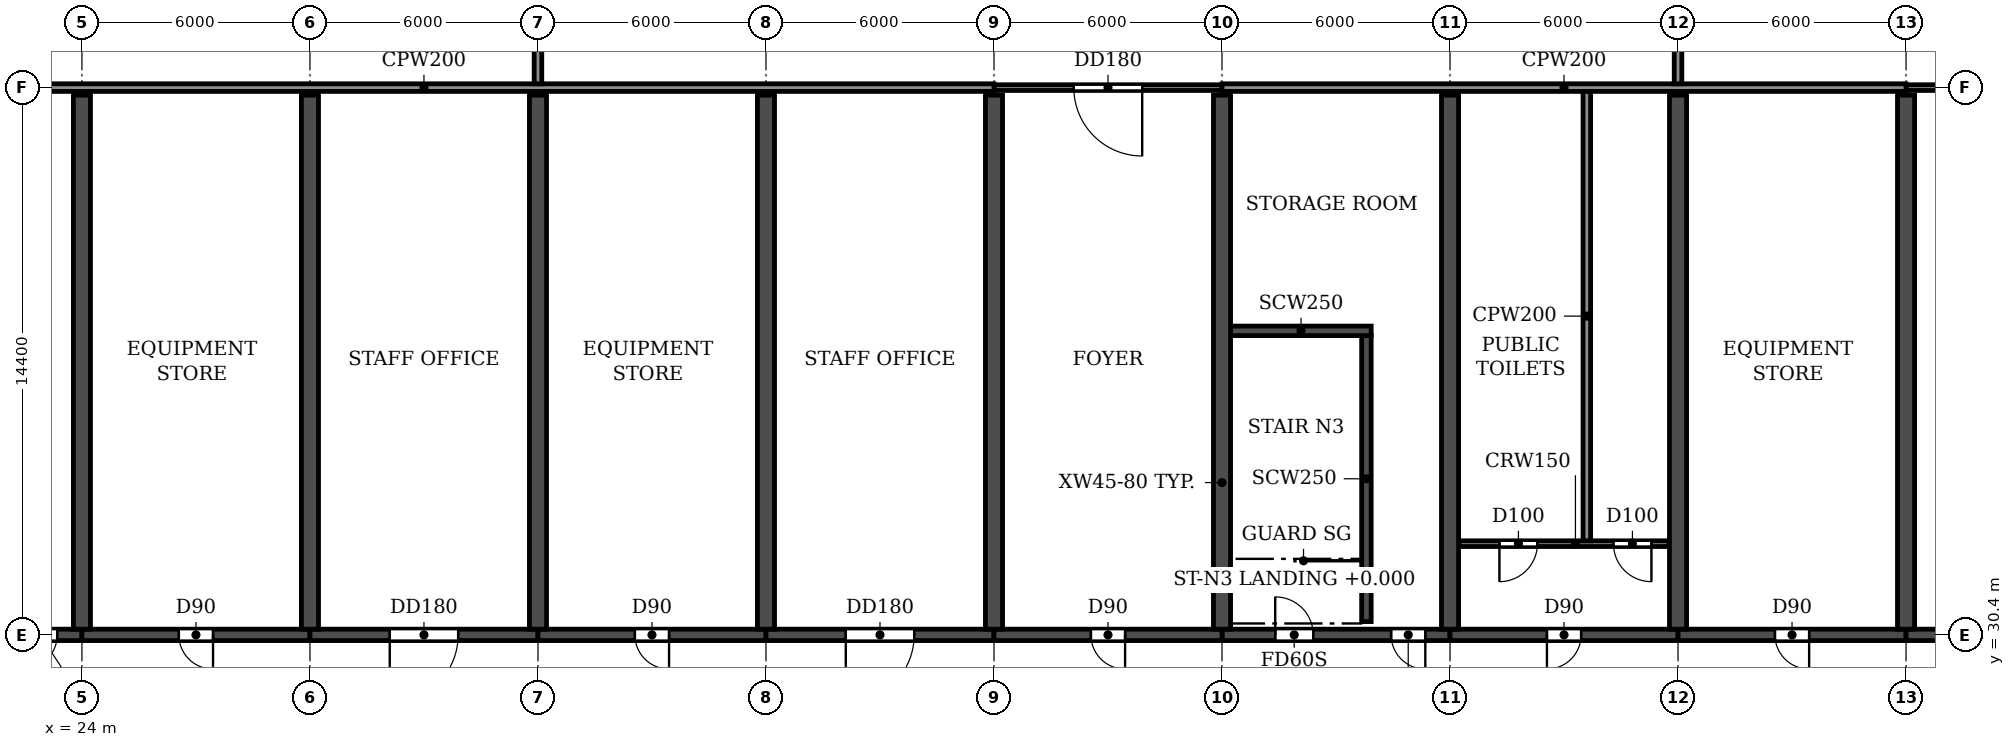
"""IFC4 building model, lengths in metres.
Left out: names, types, materials, properties, quantities, classifications, styles, units other than length and angle.
Written with IfcOpenShell. Run it as: python <this file> out.ifc"""

import sys

from ifc_helpers import new_model, si_unit, direction, frame, frame_2d, origin, place, context, subcontext, project, spatial, rectangle, extrude, element, fill, save


model = new_model("IFC4")
c1 = context("Model", 3, precision=1e-05, world=origin(), true_north=direction((0.0, 1.0)))
c2 = subcontext(c1, "Body", "Model", "MODEL_VIEW")
j1 = project(units=[si_unit("LENGTHUNIT", "METRE"), si_unit("PLANEANGLEUNIT", "RADIAN")], contexts=[c1])
p1 = place(None, origin())
s1 = spatial("IfcSite", under=j1, at=p1, CompositionType="ELEMENT")
p2 = place(p1, origin())
s2 = spatial("IfcBuilding", under=s1, at=p2, CompositionType="ELEMENT")
p3 = place(p2, frame((0.0, 0.0, 19.2)))
s3 = spatial("IfcBuildingStorey", under=s2, at=p3, CompositionType="ELEMENT", Elevation=19.2)
for number, where, z_axis, x_axis in (
    (1, (24.0, 30.55, 0.0), (0.0, 0.0, 1.0), (0.0, 1.0, 0.0)),
    (2, (30.0, 30.55, 0.0), (0.0, 0.0, 1.0), (0.0, 1.0, 0.0)),
    (3, (36.0, 30.55, 0.0), (0.0, 0.0, 1.0), (0.0, 1.0, 0.0)),
    (4, (42.0, 30.55, 0.0), (0.0, 0.0, 1.0), (0.0, 1.0, 0.0)),
    (5, (48.0, 30.55, 0.0), (0.0, 0.0, 1.0), (0.0, 1.0, 0.0)),
    (6, (54.0, 30.55, 0.0), (0.0, 0.0, 1.0), (0.0, 1.0, 0.0)),
    (7, (60.0, 30.55, 0.0), (0.0, 0.0, 1.0), (0.0, 1.0, 0.0)),
    (8, (66.0, 30.55, 0.0), (0.0, 0.0, 1.0), (0.0, 1.0, 0.0)),
    (9, (72.0, 30.55, 0.0), (0.0, 0.0, 1.0), (0.0, 1.0, 0.0)),
):
    element("IfcWall", number, at=place(p3, frame(where, z_axis=z_axis, x_axis=x_axis)), inside=s3, PredefinedType="SHEAR", context=c2, shape_type="SweptSolid", body=[
        extrude(rectangle(XDim=14.05, YDim=0.45, at=frame_2d((7.025, 0.0))), origin(), (0.0, 0.0, 1.0), 3.95),
    ])
p4 = place(p3, frame((18.0, 30.4, 0.0), z_axis=(0.0, 0.0, 1.0), x_axis=(1.0, 0.0, 0.0)))
e10 = element("IfcWall", 10, at=p4, inside=s3, PredefinedType="SHEAR", context=c2, shape_type="SweptSolid", body=[
    extrude(rectangle(XDim=6.0, YDim=0.3, at=frame_2d((3.0, 0.0))), origin(), (0.0, 0.0, 1.0), 3.35),
])
p5 = place(p4, frame((1.4, 0.0, 0.0)))
e11 = element("IfcOpeningElement", 11, at=p5, cuts=e10, PredefinedType="OPENING", context=c2, shape_type="SweptSolid", body=[
    extrude(rectangle(XDim=1.0, YDim=2.1, at=frame_2d((0.5, 1.05))), frame((0.0, 0.16, 0.0), z_axis=(0.0, -1.0, 0.0), x_axis=(1.0, 0.0, 0.0)), (0.0, 0.0, 1.0), 0.32),
])
p6 = place(p4, frame((4.45, 0.0, 0.0)))
e12 = element("IfcOpeningElement", 12, at=p6, cuts=e10, PredefinedType="OPENING", context=c2, shape_type="SweptSolid", body=[
    extrude(rectangle(XDim=0.9, YDim=2.1, at=frame_2d((0.45, 1.05))), frame((0.0, 0.16, 0.0), z_axis=(0.0, -1.0, 0.0), x_axis=(1.0, 0.0, 0.0)), (0.0, 0.0, 1.0), 0.32),
])
p7 = place(p3, frame((24.0, 30.4, 0.0), z_axis=(0.0, 0.0, 1.0), x_axis=(1.0, 0.0, 0.0)))
e13 = element("IfcWall", 13, at=p7, inside=s3, PredefinedType="SHEAR", context=c2, shape_type="SweptSolid", body=[
    extrude(rectangle(XDim=6.0, YDim=0.3, at=frame_2d((3.0, 0.0))), origin(), (0.0, 0.0, 1.0), 3.35),
])
p8 = place(p7, frame((2.55, 0.0, 0.0)))
e14 = element("IfcOpeningElement", 14, at=p8, cuts=e13, PredefinedType="OPENING", context=c2, shape_type="SweptSolid", body=[
    extrude(rectangle(XDim=0.9, YDim=2.1, at=frame_2d((0.45, 1.05))), frame((0.0, 0.16, 0.0), z_axis=(0.0, -1.0, 0.0), x_axis=(1.0, 0.0, 0.0)), (0.0, 0.0, 1.0), 0.32),
])
p9 = place(p3, frame((30.0, 30.4, 0.0), z_axis=(0.0, 0.0, 1.0), x_axis=(1.0, 0.0, 0.0)))
e15 = element("IfcWall", 15, at=p9, inside=s3, PredefinedType="SHEAR", context=c2, shape_type="SweptSolid", body=[
    extrude(rectangle(XDim=6.0, YDim=0.3, at=frame_2d((3.0, 0.0))), origin(), (0.0, 0.0, 1.0), 3.35),
])
p10 = place(p9, frame((2.1, 0.0, 0.0)))
e16 = element("IfcOpeningElement", 16, at=p10, cuts=e15, PredefinedType="OPENING", context=c2, shape_type="SweptSolid", body=[
    extrude(rectangle(XDim=1.8, YDim=2.1, at=frame_2d((0.9, 1.05))), frame((0.0, 0.16, 0.0), z_axis=(0.0, -1.0, 0.0), x_axis=(1.0, 0.0, 0.0)), (0.0, 0.0, 1.0), 0.32),
])
p11 = place(p3, frame((36.0, 30.4, 0.0), z_axis=(0.0, 0.0, 1.0), x_axis=(1.0, 0.0, 0.0)))
e17 = element("IfcWall", 17, at=p11, inside=s3, PredefinedType="SHEAR", context=c2, shape_type="SweptSolid", body=[
    extrude(rectangle(XDim=6.0, YDim=0.3, at=frame_2d((3.0, 0.0))), origin(), (0.0, 0.0, 1.0), 3.35),
])
p12 = place(p11, frame((2.55, 0.0, 0.0)))
e18 = element("IfcOpeningElement", 18, at=p12, cuts=e17, PredefinedType="OPENING", context=c2, shape_type="SweptSolid", body=[
    extrude(rectangle(XDim=0.9, YDim=2.1, at=frame_2d((0.45, 1.05))), frame((0.0, 0.16, 0.0), z_axis=(0.0, -1.0, 0.0), x_axis=(1.0, 0.0, 0.0)), (0.0, 0.0, 1.0), 0.32),
])
p13 = place(p3, frame((42.0, 30.4, 0.0), z_axis=(0.0, 0.0, 1.0), x_axis=(1.0, 0.0, 0.0)))
e19 = element("IfcWall", 19, at=p13, inside=s3, PredefinedType="SHEAR", context=c2, shape_type="SweptSolid", body=[
    extrude(rectangle(XDim=6.0, YDim=0.3, at=frame_2d((3.0, 0.0))), origin(), (0.0, 0.0, 1.0), 3.35),
])
p14 = place(p13, frame((2.1, 0.0, 0.0)))
e20 = element("IfcOpeningElement", 20, at=p14, cuts=e19, PredefinedType="OPENING", context=c2, shape_type="SweptSolid", body=[
    extrude(rectangle(XDim=1.8, YDim=2.1, at=frame_2d((0.9, 1.05))), frame((0.0, 0.16, 0.0), z_axis=(0.0, -1.0, 0.0), x_axis=(1.0, 0.0, 0.0)), (0.0, 0.0, 1.0), 0.32),
])
p15 = place(p3, frame((48.0, 30.4, 0.0), z_axis=(0.0, 0.0, 1.0), x_axis=(1.0, 0.0, 0.0)))
e21 = element("IfcWall", 21, at=p15, inside=s3, PredefinedType="SHEAR", context=c2, shape_type="SweptSolid", body=[
    extrude(rectangle(XDim=6.0, YDim=0.3, at=frame_2d((3.0, 0.0))), origin(), (0.0, 0.0, 1.0), 3.35),
])
p16 = place(p15, frame((2.55, 0.0, 0.0)))
e22 = element("IfcOpeningElement", 22, at=p16, cuts=e21, PredefinedType="OPENING", context=c2, shape_type="SweptSolid", body=[
    extrude(rectangle(XDim=0.9, YDim=2.1, at=frame_2d((0.45, 1.05))), frame((0.0, 0.16, 0.0), z_axis=(0.0, -1.0, 0.0), x_axis=(1.0, 0.0, 0.0)), (0.0, 0.0, 1.0), 0.32),
])
p17 = place(p3, frame((54.0, 30.4, 0.0), z_axis=(0.0, 0.0, 1.0), x_axis=(1.0, 0.0, 0.0)))
e23 = element("IfcWall", 23, at=p17, inside=s3, PredefinedType="SHEAR", context=c2, shape_type="SweptSolid", body=[
    extrude(rectangle(XDim=6.0, YDim=0.3, at=frame_2d((3.0, 0.0))), origin(), (0.0, 0.0, 1.0), 3.35),
])
p18 = place(p17, frame((1.4, 0.0, 0.0)))
e24 = element("IfcOpeningElement", 24, at=p18, cuts=e23, PredefinedType="OPENING", context=c2, shape_type="SweptSolid", body=[
    extrude(rectangle(XDim=1.0, YDim=2.1, at=frame_2d((0.5, 1.05))), frame((0.0, 0.16, 0.0), z_axis=(0.0, -1.0, 0.0), x_axis=(1.0, 0.0, 0.0)), (0.0, 0.0, 1.0), 0.32),
])
p19 = place(p17, frame((4.45, 0.0, 0.0)))
e25 = element("IfcOpeningElement", 25, at=p19, cuts=e23, PredefinedType="OPENING", context=c2, shape_type="SweptSolid", body=[
    extrude(rectangle(XDim=0.9, YDim=2.1, at=frame_2d((0.45, 1.05))), frame((0.0, 0.16, 0.0), z_axis=(0.0, -1.0, 0.0), x_axis=(1.0, 0.0, 0.0)), (0.0, 0.0, 1.0), 0.32),
])
p20 = place(p3, frame((60.0, 30.4, 0.0), z_axis=(0.0, 0.0, 1.0), x_axis=(1.0, 0.0, 0.0)))
e26 = element("IfcWall", 26, at=p20, inside=s3, PredefinedType="SHEAR", context=c2, shape_type="SweptSolid", body=[
    extrude(rectangle(XDim=6.0, YDim=0.3, at=frame_2d((3.0, 0.0))), origin(), (0.0, 0.0, 1.0), 3.35),
])
p21 = place(p20, frame((2.55, 0.0, 0.0)))
e27 = element("IfcOpeningElement", 27, at=p21, cuts=e26, PredefinedType="OPENING", context=c2, shape_type="SweptSolid", body=[
    extrude(rectangle(XDim=0.9, YDim=2.1, at=frame_2d((0.45, 1.05))), frame((0.0, 0.16, 0.0), z_axis=(0.0, -1.0, 0.0), x_axis=(1.0, 0.0, 0.0)), (0.0, 0.0, 1.0), 0.32),
])
p22 = place(p3, frame((66.0, 30.4, 0.0), z_axis=(0.0, 0.0, 1.0), x_axis=(1.0, 0.0, 0.0)))
e28 = element("IfcWall", 28, at=p22, inside=s3, PredefinedType="SHEAR", context=c2, shape_type="SweptSolid", body=[
    extrude(rectangle(XDim=6.0, YDim=0.3, at=frame_2d((3.0, 0.0))), origin(), (0.0, 0.0, 1.0), 3.35),
])
p23 = place(p22, frame((2.55, 0.0, 0.0)))
e29 = element("IfcOpeningElement", 29, at=p23, cuts=e28, PredefinedType="OPENING", context=c2, shape_type="SweptSolid", body=[
    extrude(rectangle(XDim=0.9, YDim=2.1, at=frame_2d((0.45, 1.05))), frame((0.0, 0.16, 0.0), z_axis=(0.0, -1.0, 0.0), x_axis=(1.0, 0.0, 0.0)), (0.0, 0.0, 1.0), 0.32),
])
p24 = place(p3, frame((72.0, 30.4, 0.0), z_axis=(0.0, 0.0, 1.0), x_axis=(1.0, 0.0, 0.0)))
e30 = element("IfcWall", 30, at=p24, inside=s3, PredefinedType="SHEAR", context=c2, shape_type="SweptSolid", body=[
    extrude(rectangle(XDim=6.0, YDim=0.3, at=frame_2d((3.0, 0.0))), origin(), (0.0, 0.0, 1.0), 3.35),
])
p25 = place(p24, frame((2.55, 0.0, 0.0)))
e31 = element("IfcOpeningElement", 31, at=p25, cuts=e30, PredefinedType="OPENING", context=c2, shape_type="SweptSolid", body=[
    extrude(rectangle(XDim=0.9, YDim=2.1, at=frame_2d((0.45, 1.05))), frame((0.0, 0.16, 0.0), z_axis=(0.0, -1.0, 0.0), x_axis=(1.0, 0.0, 0.0)), (0.0, 0.0, 1.0), 0.32),
])
p26 = place(p3, frame((57.8, 30.75, 0.0), z_axis=(0.0, 0.0, 1.0), x_axis=(0.0, 1.0, 0.0)))
e32 = element("IfcWall", 32, at=p26, inside=s3, PredefinedType="SOLIDWALL", context=c2, shape_type="SweptSolid", body=[
    extrude(rectangle(XDim=7.525, YDim=0.25, at=frame_2d((3.762, 0.0))), origin(), (0.0, 0.0, 1.0), 3.95),
])
p27 = place(p3, frame((54.0, 38.4, 0.0), z_axis=(0.0, 0.0, 1.0), x_axis=(1.0, 0.0, 0.0)))
e33 = element("IfcWall", 33, at=p27, inside=s3, PredefinedType="SOLIDWALL", context=c2, shape_type="SweptSolid", body=[
    extrude(rectangle(XDim=3.925, YDim=0.25, at=frame_2d((1.962, 0.0))), origin(), (0.0, 0.0, 1.0), 3.95),
])
p28 = place(p3, frame((60.235, 32.8, 0.0), z_axis=(0.0, 0.0, 1.0), x_axis=(1.0, 0.0, 0.0)))
e34 = element("IfcWall", 34, at=p28, inside=s3, PredefinedType="PARTITIONING", context=c2, shape_type="SweptSolid", body=[
    extrude(rectangle(XDim=5.53, YDim=0.15, at=frame_2d((2.765, 0.0))), origin(), (0.0, 0.0, 1.0), 3.95),
])
p29 = place(p28, frame((1.065, 0.0, 0.0)))
e35 = element("IfcOpeningElement", 35, at=p29, cuts=e34, PredefinedType="OPENING", context=c2, shape_type="SweptSolid", body=[
    extrude(rectangle(XDim=1.0, YDim=2.1, at=frame_2d((0.5, 1.05))), frame((0.0, 0.085, 0.0), z_axis=(0.0, -1.0, 0.0), x_axis=(1.0, 0.0, 0.0)), (0.0, 0.0, 1.0), 0.17),
])
p30 = place(p28, frame((4.065, 0.0, 0.0)))
e36 = element("IfcOpeningElement", 36, at=p30, cuts=e34, PredefinedType="OPENING", context=c2, shape_type="SweptSolid", body=[
    extrude(rectangle(XDim=1.0, YDim=2.1, at=frame_2d((0.5, 1.05))), frame((0.0, 0.085, 0.0), z_axis=(0.0, -1.0, 0.0), x_axis=(1.0, 0.0, 0.0)), (0.0, 0.0, 1.0), 0.17),
])
p31 = place(p3, frame((48.0, 44.8, 0.0), z_axis=(0.0, 0.0, 1.0), x_axis=(1.0, 0.0, 0.0)))
e37 = element("IfcWall", 37, at=p31, inside=s3, PredefinedType="PARTITIONING", context=c2, shape_type="SweptSolid", body=[
    extrude(rectangle(XDim=6.0, YDim=0.15, at=frame_2d((3.0, 0.0))), origin(), (0.0, 0.0, 1.0), 3.95),
])
p32 = place(p31, frame((2.1, 0.0, 0.0)))
e38 = element("IfcOpeningElement", 38, at=p32, cuts=e37, PredefinedType="OPENING", context=c2, shape_type="SweptSolid", body=[
    extrude(rectangle(XDim=1.8, YDim=2.1, at=frame_2d((0.9, 1.05))), frame((0.0, 0.085, 0.0), z_axis=(0.0, -1.0, 0.0), x_axis=(1.0, 0.0, 0.0)), (0.0, 0.0, 1.0), 0.17),
])
p33 = place(p3, frame((72.0, 44.8, 0.0), z_axis=(0.0, 0.0, 1.0), x_axis=(1.0, 0.0, 0.0)))
e39 = element("IfcWall", 39, at=p33, inside=s3, PredefinedType="PARTITIONING", context=c2, shape_type="SweptSolid", body=[
    extrude(rectangle(XDim=6.0, YDim=0.15, at=frame_2d((3.0, 0.0))), origin(), (0.0, 0.0, 1.0), 3.95),
])
p34 = place(p33, frame((2.1, 0.0, 0.0)))
e40 = element("IfcOpeningElement", 40, at=p34, cuts=e39, PredefinedType="OPENING", context=c2, shape_type="SweptSolid", body=[
    extrude(rectangle(XDim=1.8, YDim=2.1, at=frame_2d((0.9, 1.05))), frame((0.0, 0.085, 0.0), z_axis=(0.0, -1.0, 0.0), x_axis=(1.0, 0.0, 0.0)), (0.0, 0.0, 1.0), 0.17),
])
p35 = place(p3, frame((18.0, 44.8, 0.0), z_axis=(0.0, 0.0, 1.0), x_axis=(1.0, 0.0, 0.0)))
e41 = element("IfcWall", 41, at=p35, inside=s3, PredefinedType="PARTITIONING", context=c2, shape_type="SweptSolid", body=[
    extrude(rectangle(XDim=30.0, YDim=0.2, at=frame_2d((15.0, 0.0))), origin(), (0.0, 0.0, 1.0), 3.95),
])
p36 = place(p3, frame((54.0, 44.8, 0.0), z_axis=(0.0, 0.0, 1.0), x_axis=(1.0, 0.0, 0.0)))
e42 = element("IfcWall", 42, at=p36, inside=s3, PredefinedType="PARTITIONING", context=c2, shape_type="SweptSolid", body=[
    extrude(rectangle(XDim=18.0, YDim=0.2, at=frame_2d((9.0, 0.0))), origin(), (0.0, 0.0, 1.0), 3.95),
])
p37 = place(p3, frame((36.0, 44.9, 0.0), z_axis=(0.0, 0.0, 1.0), x_axis=(0.0, 1.0, 0.0)))
e43 = element("IfcWall", 43, at=p37, inside=s3, PredefinedType="PARTITIONING", context=c2, shape_type="SweptSolid", body=[
    extrude(rectangle(XDim=5.84, YDim=0.2, at=frame_2d((2.92, 0.0))), origin(), (0.0, 0.0, 1.0), 3.95),
])
p38 = place(p3, frame((63.6, 32.875, 0.0), z_axis=(0.0, 0.0, 1.0), x_axis=(0.0, 1.0, 0.0)))
e44 = element("IfcWall", 44, at=p38, inside=s3, PredefinedType="PARTITIONING", context=c2, shape_type="SweptSolid", body=[
    extrude(rectangle(XDim=11.825, YDim=0.2, at=frame_2d((5.913, 0.0))), origin(), (0.0, 0.0, 1.0), 3.95),
])
p39 = place(p3, frame((66.0, 44.9, 0.0), z_axis=(0.0, 0.0, 1.0), x_axis=(0.0, 1.0, 0.0)))
e45 = element("IfcWall", 45, at=p39, inside=s3, PredefinedType="PARTITIONING", context=c2, shape_type="SweptSolid", body=[
    extrude(rectangle(XDim=5.84, YDim=0.2, at=frame_2d((2.92, 0.0))), origin(), (0.0, 0.0, 1.0), 3.95),
])
p40 = place(p6, frame((0.9, 0.0, 0.0), z_axis=(0.0, 0.0, 1.0), x_axis=(-1.0, 0.0, 0.0)))
e46 = element("IfcDoor", 46, at=p40, inside=s3, OperationType="SINGLE_SWING_RIGHT", PredefinedType="DOOR", context=c2, shape_type="SweptSolid", body=[
    extrude(rectangle(XDim=0.9, YDim=2.1, at=frame_2d((0.45, 1.05))), frame((0.0, 0.025, 0.0), z_axis=(0.0, -1.0, 0.0), x_axis=(1.0, 0.0, 0.0)), (0.0, 0.0, 1.0), 0.05),
])
fill(e12, e46)
p41 = place(p8, frame((0.9, 0.0, 0.0), z_axis=(0.0, 0.0, 1.0), x_axis=(-1.0, 0.0, 0.0)))
e47 = element("IfcDoor", 47, at=p41, inside=s3, OperationType="SINGLE_SWING_LEFT", PredefinedType="DOOR", context=c2, shape_type="SweptSolid", body=[
    extrude(rectangle(XDim=0.9, YDim=2.1, at=frame_2d((0.45, 1.05))), frame((0.0, 0.025, 0.0), z_axis=(0.0, -1.0, 0.0), x_axis=(1.0, 0.0, 0.0)), (0.0, 0.0, 1.0), 0.05),
])
fill(e14, e47)
p42 = place(p10, frame((1.8, 0.0, 0.0), z_axis=(0.0, 0.0, 1.0), x_axis=(-1.0, 0.0, 0.0)))
e48 = element("IfcDoor", 48, at=p42, inside=s3, OperationType="DOUBLE_DOOR_SINGLE_SWING", PredefinedType="DOOR", context=c2, shape_type="SweptSolid", body=[
    extrude(rectangle(XDim=1.8, YDim=2.1, at=frame_2d((0.9, 1.05))), frame((0.0, 0.025, 0.0), z_axis=(0.0, -1.0, 0.0), x_axis=(1.0, 0.0, 0.0)), (0.0, 0.0, 1.0), 0.05),
])
fill(e16, e48)
p43 = place(p12, frame((0.9, 0.0, 0.0), z_axis=(0.0, 0.0, 1.0), x_axis=(-1.0, 0.0, 0.0)))
e49 = element("IfcDoor", 49, at=p43, inside=s3, OperationType="SINGLE_SWING_LEFT", PredefinedType="DOOR", context=c2, shape_type="SweptSolid", body=[
    extrude(rectangle(XDim=0.9, YDim=2.1, at=frame_2d((0.45, 1.05))), frame((0.0, 0.025, 0.0), z_axis=(0.0, -1.0, 0.0), x_axis=(1.0, 0.0, 0.0)), (0.0, 0.0, 1.0), 0.05),
])
fill(e18, e49)
p44 = place(p14, frame((1.8, 0.0, 0.0), z_axis=(0.0, 0.0, 1.0), x_axis=(-1.0, 0.0, 0.0)))
e50 = element("IfcDoor", 50, at=p44, inside=s3, OperationType="DOUBLE_DOOR_SINGLE_SWING", PredefinedType="DOOR", context=c2, shape_type="SweptSolid", body=[
    extrude(rectangle(XDim=1.8, YDim=2.1, at=frame_2d((0.9, 1.05))), frame((0.0, 0.025, 0.0), z_axis=(0.0, -1.0, 0.0), x_axis=(1.0, 0.0, 0.0)), (0.0, 0.0, 1.0), 0.05),
])
fill(e20, e50)
p45 = place(p16, frame((0.9, 0.0, 0.0), z_axis=(0.0, 0.0, 1.0), x_axis=(-1.0, 0.0, 0.0)))
e51 = element("IfcDoor", 51, at=p45, inside=s3, OperationType="SINGLE_SWING_LEFT", PredefinedType="DOOR", context=c2, shape_type="SweptSolid", body=[
    extrude(rectangle(XDim=0.9, YDim=2.1, at=frame_2d((0.45, 1.05))), frame((0.0, 0.025, 0.0), z_axis=(0.0, -1.0, 0.0), x_axis=(1.0, 0.0, 0.0)), (0.0, 0.0, 1.0), 0.05),
])
fill(e22, e51)
p46 = place(p18, origin())
e52 = element("IfcDoor", 52, at=p46, inside=s3, OperationType="SINGLE_SWING_LEFT", PredefinedType="DOOR", context=c2, shape_type="SweptSolid", body=[
    extrude(rectangle(XDim=1.0, YDim=2.1, at=frame_2d((0.5, 1.05))), frame((0.0, 0.025, 0.0), z_axis=(0.0, -1.0, 0.0), x_axis=(1.0, 0.0, 0.0)), (0.0, 0.0, 1.0), 0.05),
])
fill(e24, e52)
p47 = place(p19, frame((0.9, 0.0, 0.0), z_axis=(0.0, 0.0, 1.0), x_axis=(-1.0, 0.0, 0.0)))
e53 = element("IfcDoor", 53, at=p47, inside=s3, OperationType="SINGLE_SWING_LEFT", PredefinedType="DOOR", context=c2, shape_type="SweptSolid", body=[
    extrude(rectangle(XDim=0.9, YDim=2.1, at=frame_2d((0.45, 1.05))), frame((0.0, 0.025, 0.0), z_axis=(0.0, -1.0, 0.0), x_axis=(1.0, 0.0, 0.0)), (0.0, 0.0, 1.0), 0.05),
])
fill(e25, e53)
p48 = place(p21, frame((0.9, 0.0, 0.0), z_axis=(0.0, 0.0, 1.0), x_axis=(-1.0, 0.0, 0.0)))
e54 = element("IfcDoor", 54, at=p48, inside=s3, OperationType="SINGLE_SWING_RIGHT", PredefinedType="DOOR", context=c2, shape_type="SweptSolid", body=[
    extrude(rectangle(XDim=0.9, YDim=2.1, at=frame_2d((0.45, 1.05))), frame((0.0, 0.025, 0.0), z_axis=(0.0, -1.0, 0.0), x_axis=(1.0, 0.0, 0.0)), (0.0, 0.0, 1.0), 0.05),
])
fill(e27, e54)
p49 = place(p23, frame((0.9, 0.0, 0.0), z_axis=(0.0, 0.0, 1.0), x_axis=(-1.0, 0.0, 0.0)))
e55 = element("IfcDoor", 55, at=p49, inside=s3, OperationType="SINGLE_SWING_LEFT", PredefinedType="DOOR", context=c2, shape_type="SweptSolid", body=[
    extrude(rectangle(XDim=0.9, YDim=2.1, at=frame_2d((0.45, 1.05))), frame((0.0, 0.025, 0.0), z_axis=(0.0, -1.0, 0.0), x_axis=(1.0, 0.0, 0.0)), (0.0, 0.0, 1.0), 0.05),
])
fill(e29, e55)
p50 = place(p29, frame((1.0, 0.0, 0.0), z_axis=(0.0, 0.0, 1.0), x_axis=(-1.0, 0.0, 0.0)))
e56 = element("IfcDoor", 56, at=p50, inside=s3, OperationType="SINGLE_SWING_RIGHT", PredefinedType="DOOR", context=c2, shape_type="SweptSolid", body=[
    extrude(rectangle(XDim=1.0, YDim=2.1, at=frame_2d((0.5, 1.05))), frame((0.0, 0.025, 0.0), z_axis=(0.0, -1.0, 0.0), x_axis=(1.0, 0.0, 0.0)), (0.0, 0.0, 1.0), 0.05),
])
fill(e35, e56)
p51 = place(p30, frame((1.0, 0.0, 0.0), z_axis=(0.0, 0.0, 1.0), x_axis=(-1.0, 0.0, 0.0)))
e57 = element("IfcDoor", 57, at=p51, inside=s3, OperationType="SINGLE_SWING_LEFT", PredefinedType="DOOR", context=c2, shape_type="SweptSolid", body=[
    extrude(rectangle(XDim=1.0, YDim=2.1, at=frame_2d((0.5, 1.05))), frame((0.0, 0.025, 0.0), z_axis=(0.0, -1.0, 0.0), x_axis=(1.0, 0.0, 0.0)), (0.0, 0.0, 1.0), 0.05),
])
fill(e36, e57)
p52 = place(p32, frame((1.8, 0.0, 0.0), z_axis=(0.0, 0.0, 1.0), x_axis=(-1.0, 0.0, 0.0)))
e58 = element("IfcDoor", 58, at=p52, inside=s3, OperationType="DOUBLE_DOOR_SINGLE_SWING", PredefinedType="DOOR", context=c2, shape_type="SweptSolid", body=[
    extrude(rectangle(XDim=1.8, YDim=2.1, at=frame_2d((0.9, 1.05))), frame((0.0, 0.025, 0.0), z_axis=(0.0, -1.0, 0.0), x_axis=(1.0, 0.0, 0.0)), (0.0, 0.0, 1.0), 0.05),
])
fill(e38, e58)
save(model, sys.argv[1])
